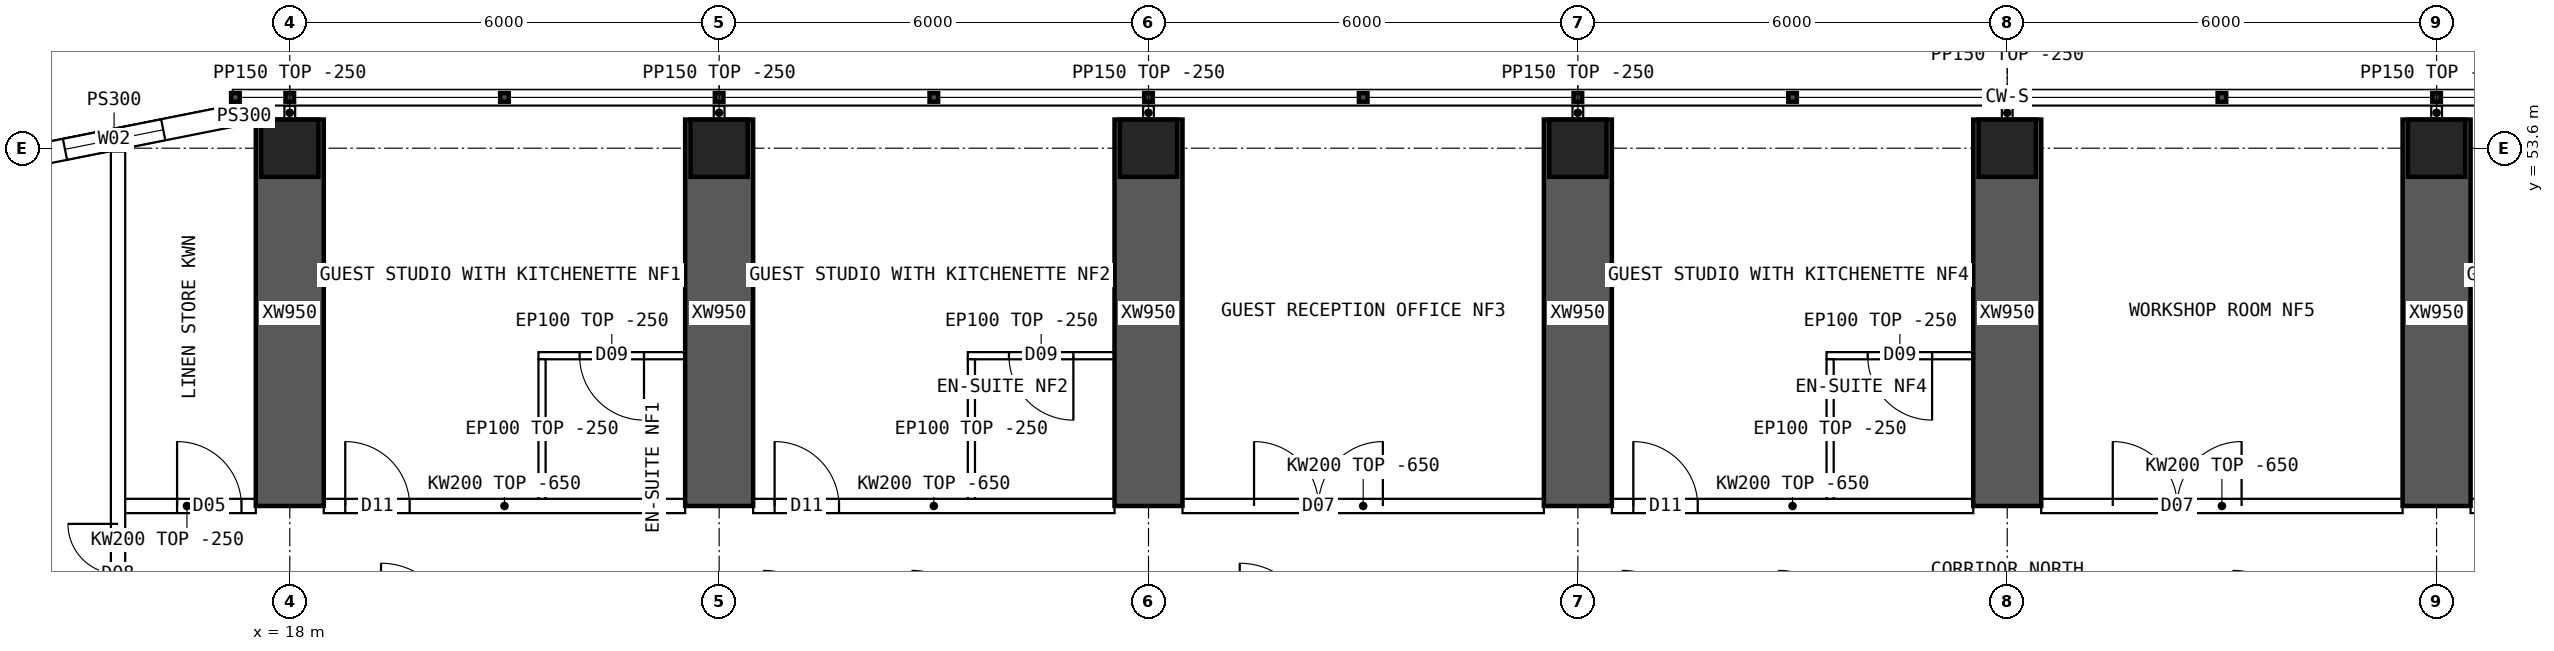
"""IFC4 building model, lengths in metres.
Left out: names, types, materials, properties, quantities, classifications, styles, units other than length and angle.
Written with IfcOpenShell. Run it as: python <this file> out.ifc"""

import sys

from ifc_helpers import new_model, si_unit, direction, frame, frame_2d, origin, origin_2d, place, context, subcontext, project, spatial, polyline, rectangle, hollow_rectangle, outline, extrude, element, fill, save


model = new_model("IFC4")
c1 = context("Model", 3, precision=1e-05, world=origin(), true_north=direction((0.0, 1.0)))
c2 = subcontext(c1, "Body", "Model", "MODEL_VIEW")
j1 = project(units=[si_unit("LENGTHUNIT", "METRE"), si_unit("PLANEANGLEUNIT", "RADIAN")], contexts=[c1])
p1 = place(None, origin())
s1 = spatial("IfcSite", under=j1, at=p1, CompositionType="ELEMENT")
p2 = place(p1, origin())
s2 = spatial("IfcBuilding", under=s1, at=p2, CompositionType="ELEMENT")
p3 = place(p2, frame((0.0, 0.0, 140.35)))
s3 = spatial("IfcBuildingStorey", under=s2, at=p3, CompositionType="ELEMENT", Elevation=140.35)
for number, where, z_axis, x_axis in (
    (1, (18.0, 53.6, 0.0), (0.0, 0.0, 1.0), (1.0, 0.0, 0.0)),
    (2, (24.0, 53.6, 0.0), (0.0, 0.0, 1.0), (1.0, 0.0, 0.0)),
    (3, (30.0, 53.6, 0.0), (0.0, 0.0, 1.0), (1.0, 0.0, 0.0)),
    (4, (36.0, 53.6, 0.0), (0.0, 0.0, 1.0), (1.0, 0.0, 0.0)),
    (5, (42.0, 53.6, 0.0), (0.0, 0.0, 1.0), (1.0, 0.0, 0.0)),
    (6, (48.0, 53.6, 0.0), (0.0, 0.0, 1.0), (1.0, 0.0, 0.0)),
):
    element("IfcColumn", number, at=place(p3, frame(where, z_axis=z_axis, x_axis=x_axis)), inside=s3, PredefinedType="COLUMN", context=c2, shape_type="SweptSolid", body=[
        extrude(hollow_rectangle(XDim=0.8, YDim=0.8, WallThickness=0.08, at=origin_2d()), origin(), (0.0, 0.0, 1.0), 4.5),
    ])
for number, where, z_axis, x_axis in (
    (7, (18.0, 48.6, 0.0), (0.0, 0.0, 1.0), (0.0, 1.0, 0.0)),
    (8, (24.0, 48.6, 0.0), (0.0, 0.0, 1.0), (0.0, 1.0, 0.0)),
    (9, (30.0, 48.6, 0.0), (0.0, 0.0, 1.0), (0.0, 1.0, 0.0)),
    (10, (36.0, 48.6, 0.0), (0.0, 0.0, 1.0), (0.0, 1.0, 0.0)),
    (11, (42.0, 48.6, 0.0), (0.0, 0.0, 1.0), (0.0, 1.0, 0.0)),
    (12, (48.0, 48.6, 0.0), (0.0, 0.0, 1.0), (0.0, 1.0, 0.0)),
):
    element("IfcWall", number, at=place(p3, frame(where, z_axis=z_axis, x_axis=x_axis)), inside=s3, PredefinedType="SHEAR", context=c2, shape_type="SweptSolid", body=[
        extrude(rectangle(XDim=5.4, YDim=0.95, at=frame_2d((2.7, 0.0))), origin(), (0.0, 0.0, 1.0), 4.5),
    ])
p4 = place(p3, frame((17.2, 54.05, 0.0), z_axis=(0.0, 0.0, 1.0), x_axis=(-0.98078325777, -0.195100490205, 0.0)))
e13 = element("IfcWall", 13, at=p4, inside=s3, PredefinedType="SOLIDWALL", context=c2, shape_type="SweptSolid", body=[
    extrude(outline(polyline([(-0.03, -0.15), (3.405, -0.15), (3.345, 0.15), (0.03, 0.15), (-0.03, -0.15)])), origin(), (0.0, 0.0, 1.0), 4.25),
])
p5 = place(p4, frame((0.988, 0.0, 0.9)))
e14 = element("IfcOpeningElement", 14, at=p5, cuts=e13, PredefinedType="OPENING", context=c2, shape_type="SweptSolid", body=[
    extrude(rectangle(XDim=1.4, YDim=1.8, at=frame_2d((0.7, 0.9))), frame((0.0, 0.16, 0.0), z_axis=(0.0, -1.0, 0.0), x_axis=(1.0, 0.0, 0.0)), (0.0, 0.0, 1.0), 0.32),
])
p6 = place(p3, frame((17.2, 54.05, 0.0), z_axis=(0.0, 0.0, 1.0), x_axis=(1.0, 0.0, 0.0)))
e15 = element("IfcWall", 15, at=p6, inside=s3, PredefinedType="SOLIDWALL", context=c2, shape_type="SweptSolid", body=[
    extrude(rectangle(XDim=0.325, YDim=0.3, at=frame_2d((0.163, 0.0))), origin(), (0.0, 0.0, 1.0), 4.25),
])
p7 = place(p3, frame((15.6, 48.6, 0.0), z_axis=(0.0, 0.0, 1.0), x_axis=(1.0, 0.0, 0.0)))
e16 = element("IfcWall", 16, at=p7, inside=s3, PredefinedType="SOLIDWALL", context=c2, shape_type="SweptSolid", body=[
    extrude(rectangle(XDim=1.925, YDim=0.2, at=frame_2d((0.962, 0.0))), origin(), (0.0, 0.0, 1.0), 4.25),
])
p8 = place(p7, frame((0.825, 0.0, 0.0)))
e17 = element("IfcOpeningElement", 17, at=p8, cuts=e16, PredefinedType="OPENING", context=c2, shape_type="SweptSolid", body=[
    extrude(rectangle(XDim=0.9, YDim=2.1, at=frame_2d((0.45, 1.05))), frame((0.0, 0.11, 0.0), z_axis=(0.0, -1.0, 0.0), x_axis=(1.0, 0.0, 0.0)), (0.0, 0.0, 1.0), 0.22),
])
p9 = place(p3, frame((18.475, 48.6, 0.0), z_axis=(0.0, 0.0, 1.0), x_axis=(1.0, 0.0, 0.0)))
e18 = element("IfcWall", 18, at=p9, inside=s3, PredefinedType="SOLIDWALL", context=c2, shape_type="SweptSolid", body=[
    extrude(outline(polyline([(0.0, 0.0), (5.05, 0.0), (5.05, 3.85), (0.0, 3.85), (0.0, 0.0)])), frame((0.0, 0.1, 0.0), z_axis=(0.0, -1.0, 0.0), x_axis=(1.0, 0.0, 0.0)), (0.0, 0.0, 1.0), 0.2),
])
p10 = place(p9, frame((0.3, 0.0, 0.0)))
e19 = element("IfcOpeningElement", 19, at=p10, cuts=e18, PredefinedType="OPENING", context=c2, shape_type="SweptSolid", body=[
    extrude(rectangle(XDim=0.9, YDim=2.1, at=frame_2d((0.45, 1.05))), frame((0.0, 0.11, 0.0), z_axis=(0.0, -1.0, 0.0), x_axis=(1.0, 0.0, 0.0)), (0.0, 0.0, 1.0), 0.22),
])
p11 = place(p3, frame((24.475, 48.6, 0.0), z_axis=(0.0, 0.0, 1.0), x_axis=(1.0, 0.0, 0.0)))
e20 = element("IfcWall", 20, at=p11, inside=s3, PredefinedType="SOLIDWALL", context=c2, shape_type="SweptSolid", body=[
    extrude(outline(polyline([(0.0, 0.0), (5.05, 0.0), (5.05, 3.85), (0.0, 3.85), (0.0, 0.0)])), frame((0.0, 0.1, 0.0), z_axis=(0.0, -1.0, 0.0), x_axis=(1.0, 0.0, 0.0)), (0.0, 0.0, 1.0), 0.2),
])
p12 = place(p11, frame((0.3, 0.0, 0.0)))
e21 = element("IfcOpeningElement", 21, at=p12, cuts=e20, PredefinedType="OPENING", context=c2, shape_type="SweptSolid", body=[
    extrude(rectangle(XDim=0.9, YDim=2.1, at=frame_2d((0.45, 1.05))), frame((0.0, 0.11, 0.0), z_axis=(0.0, -1.0, 0.0), x_axis=(1.0, 0.0, 0.0)), (0.0, 0.0, 1.0), 0.22),
])
p13 = place(p3, frame((30.475, 48.6, 0.0), z_axis=(0.0, 0.0, 1.0), x_axis=(1.0, 0.0, 0.0)))
e22 = element("IfcWall", 22, at=p13, inside=s3, PredefinedType="SOLIDWALL", context=c2, shape_type="SweptSolid", body=[
    extrude(outline(polyline([(0.0, 0.0), (5.05, 0.0), (5.05, 3.85), (0.0, 3.85), (0.0, 0.0)])), frame((0.0, 0.1, 0.0), z_axis=(0.0, -1.0, 0.0), x_axis=(1.0, 0.0, 0.0)), (0.0, 0.0, 1.0), 0.2),
])
p14 = place(p13, frame((1.0, 0.0, 0.0)))
e23 = element("IfcOpeningElement", 23, at=p14, cuts=e22, PredefinedType="OPENING", context=c2, shape_type="SweptSolid", body=[
    extrude(rectangle(XDim=1.8, YDim=2.1, at=frame_2d((0.9, 1.05))), frame((0.0, 0.11, 0.0), z_axis=(0.0, -1.0, 0.0), x_axis=(1.0, 0.0, 0.0)), (0.0, 0.0, 1.0), 0.22),
])
p15 = place(p3, frame((36.475, 48.6, 0.0), z_axis=(0.0, 0.0, 1.0), x_axis=(1.0, 0.0, 0.0)))
e24 = element("IfcWall", 24, at=p15, inside=s3, PredefinedType="SOLIDWALL", context=c2, shape_type="SweptSolid", body=[
    extrude(outline(polyline([(0.0, 0.0), (5.05, 0.0), (5.05, 3.85), (0.0, 3.85), (0.0, 0.0)])), frame((0.0, 0.1, 0.0), z_axis=(0.0, -1.0, 0.0), x_axis=(1.0, 0.0, 0.0)), (0.0, 0.0, 1.0), 0.2),
])
p16 = place(p15, frame((0.3, 0.0, 0.0)))
e25 = element("IfcOpeningElement", 25, at=p16, cuts=e24, PredefinedType="OPENING", context=c2, shape_type="SweptSolid", body=[
    extrude(rectangle(XDim=0.9, YDim=2.1, at=frame_2d((0.45, 1.05))), frame((0.0, 0.11, 0.0), z_axis=(0.0, -1.0, 0.0), x_axis=(1.0, 0.0, 0.0)), (0.0, 0.0, 1.0), 0.22),
])
p17 = place(p3, frame((42.475, 48.6, 0.0), z_axis=(0.0, 0.0, 1.0), x_axis=(1.0, 0.0, 0.0)))
e26 = element("IfcWall", 26, at=p17, inside=s3, PredefinedType="SOLIDWALL", context=c2, shape_type="SweptSolid", body=[
    extrude(outline(polyline([(0.0, 0.0), (5.05, 0.0), (5.05, 3.85), (0.0, 3.85), (0.0, 0.0)])), frame((0.0, 0.1, 0.0), z_axis=(0.0, -1.0, 0.0), x_axis=(1.0, 0.0, 0.0)), (0.0, 0.0, 1.0), 0.2),
])
p18 = place(p17, frame((1.0, 0.0, 0.0)))
e27 = element("IfcOpeningElement", 27, at=p18, cuts=e26, PredefinedType="OPENING", context=c2, shape_type="SweptSolid", body=[
    extrude(rectangle(XDim=1.8, YDim=2.1, at=frame_2d((0.9, 1.05))), frame((0.0, 0.11, 0.0), z_axis=(0.0, -1.0, 0.0), x_axis=(1.0, 0.0, 0.0)), (0.0, 0.0, 1.0), 0.22),
])
p19 = place(p3, frame((48.475, 48.6, 0.0), z_axis=(0.0, 0.0, 1.0), x_axis=(1.0, 0.0, 0.0)))
e28 = element("IfcWall", 28, at=p19, inside=s3, PredefinedType="SOLIDWALL", context=c2, shape_type="SweptSolid", body=[
    extrude(outline(polyline([(0.0, 0.0), (5.05, 0.0), (5.05, 3.85), (0.0, 3.85), (0.0, 0.0)])), frame((0.0, 0.1, 0.0), z_axis=(0.0, -1.0, 0.0), x_axis=(1.0, 0.0, 0.0)), (0.0, 0.0, 1.0), 0.2),
])
p20 = place(p19, frame((0.3, 0.0, 0.0)))
e29 = element("IfcOpeningElement", 29, at=p20, cuts=e28, PredefinedType="OPENING", context=c2, shape_type="SweptSolid", body=[
    extrude(rectangle(XDim=0.9, YDim=2.1, at=frame_2d((0.45, 1.05))), frame((0.0, 0.11, 0.0), z_axis=(0.0, -1.0, 0.0), x_axis=(1.0, 0.0, 0.0)), (0.0, 0.0, 1.0), 0.22),
])
p21 = place(p3, frame((21.475, 50.7, 0.0), z_axis=(0.0, 0.0, 1.0), x_axis=(1.0, 0.0, 0.0)))
e30 = element("IfcWall", 30, at=p21, inside=s3, PredefinedType="PARTITIONING", context=c2, shape_type="SweptSolid", body=[
    extrude(rectangle(XDim=2.05, YDim=0.1, at=frame_2d((1.025, 0.0))), origin(), (0.0, 0.0, 1.0), 4.25),
])
p22 = place(p21, frame((0.575, 0.0, 0.0)))
e31 = element("IfcOpeningElement", 31, at=p22, cuts=e30, PredefinedType="OPENING", context=c2, shape_type="SweptSolid", body=[
    extrude(rectangle(XDim=0.9, YDim=2.1, at=frame_2d((0.45, 1.05))), frame((0.0, 0.06, 0.0), z_axis=(0.0, -1.0, 0.0), x_axis=(1.0, 0.0, 0.0)), (0.0, 0.0, 1.0), 0.12),
])
p23 = place(p3, frame((21.525, 50.65, 0.0), z_axis=(0.0, 0.0, 1.0), x_axis=(0.0, -1.0, 0.0)))
e32 = element("IfcWall", 32, at=p23, inside=s3, PredefinedType="PARTITIONING", context=c2, shape_type="SweptSolid", body=[
    extrude(outline(polyline([(0.0, 0.0), (1.95, 0.0), (1.95, 3.85), (1.902, 3.85), (1.9, 4.25), (0.0, 4.25), (0.0, 0.0)])), frame((0.0, 0.05, 0.0), z_axis=(0.0, -1.0, 0.0), x_axis=(1.0, 0.0, 0.0)), (0.0, 0.0, 1.0), 0.1),
])
p24 = place(p3, frame((27.475, 50.7, 0.0), z_axis=(0.0, 0.0, 1.0), x_axis=(1.0, 0.0, 0.0)))
e33 = element("IfcWall", 33, at=p24, inside=s3, PredefinedType="PARTITIONING", context=c2, shape_type="SweptSolid", body=[
    extrude(rectangle(XDim=2.05, YDim=0.1, at=frame_2d((1.025, 0.0))), origin(), (0.0, 0.0, 1.0), 4.25),
])
p25 = place(p24, frame((0.575, 0.0, 0.0)))
e34 = element("IfcOpeningElement", 34, at=p25, cuts=e33, PredefinedType="OPENING", context=c2, shape_type="SweptSolid", body=[
    extrude(rectangle(XDim=0.9, YDim=2.1, at=frame_2d((0.45, 1.05))), frame((0.0, 0.06, 0.0), z_axis=(0.0, -1.0, 0.0), x_axis=(1.0, 0.0, 0.0)), (0.0, 0.0, 1.0), 0.12),
])
p26 = place(p3, frame((27.525, 50.65, 0.0), z_axis=(0.0, 0.0, 1.0), x_axis=(0.0, -1.0, 0.0)))
e35 = element("IfcWall", 35, at=p26, inside=s3, PredefinedType="PARTITIONING", context=c2, shape_type="SweptSolid", body=[
    extrude(outline(polyline([(0.0, 0.0), (1.95, 0.0), (1.95, 3.85), (1.902, 3.85), (1.9, 4.25), (0.0, 4.25), (0.0, 0.0)])), frame((0.0, 0.05, 0.0), z_axis=(0.0, -1.0, 0.0), x_axis=(1.0, 0.0, 0.0)), (0.0, 0.0, 1.0), 0.1),
])
p27 = place(p3, frame((39.475, 50.7, 0.0), z_axis=(0.0, 0.0, 1.0), x_axis=(1.0, 0.0, 0.0)))
e36 = element("IfcWall", 36, at=p27, inside=s3, PredefinedType="PARTITIONING", context=c2, shape_type="SweptSolid", body=[
    extrude(rectangle(XDim=2.05, YDim=0.1, at=frame_2d((1.025, 0.0))), origin(), (0.0, 0.0, 1.0), 4.25),
])
p28 = place(p27, frame((0.575, 0.0, 0.0)))
e37 = element("IfcOpeningElement", 37, at=p28, cuts=e36, PredefinedType="OPENING", context=c2, shape_type="SweptSolid", body=[
    extrude(rectangle(XDim=0.9, YDim=2.1, at=frame_2d((0.45, 1.05))), frame((0.0, 0.06, 0.0), z_axis=(0.0, -1.0, 0.0), x_axis=(1.0, 0.0, 0.0)), (0.0, 0.0, 1.0), 0.12),
])
p29 = place(p3, frame((39.525, 50.65, 0.0), z_axis=(0.0, 0.0, 1.0), x_axis=(0.0, -1.0, 0.0)))
e38 = element("IfcWall", 38, at=p29, inside=s3, PredefinedType="PARTITIONING", context=c2, shape_type="SweptSolid", body=[
    extrude(outline(polyline([(0.0, 0.0), (1.95, 0.0), (1.95, 3.85), (1.902, 3.85), (1.9, 4.25), (0.0, 4.25), (0.0, 0.0)])), frame((0.0, 0.05, 0.0), z_axis=(0.0, -1.0, 0.0), x_axis=(1.0, 0.0, 0.0)), (0.0, 0.0, 1.0), 0.1),
])
p30 = place(p3, frame((15.6, 10.446, 0.0), z_axis=(0.0, 0.0, 1.0), x_axis=(0.0, 1.0, 0.0)))
e39 = element("IfcWall", 39, at=p30, inside=s3, PredefinedType="SOLIDWALL", context=c2, shape_type="SweptSolid", body=[
    extrude(rectangle(XDim=43.107, YDim=0.2, at=frame_2d((21.554, 0.0))), origin(), (0.0, 0.0, 1.0), 4.25),
])
p31 = place(p30, frame((13.914, 0.0, 0.0)))
e40 = element("IfcOpeningElement", 40, at=p31, cuts=e39, PredefinedType="OPENING", context=c2, shape_type="SweptSolid", body=[
    extrude(rectangle(XDim=1.2, YDim=2.1, at=frame_2d((0.6, 1.05))), frame((0.0, 0.11, 0.0), z_axis=(0.0, -1.0, 0.0), x_axis=(1.0, 0.0, 0.0)), (0.0, 0.0, 1.0), 0.22),
])
p32 = place(p30, frame((22.634, 0.0, 0.0)))
e41 = element("IfcOpeningElement", 41, at=p32, cuts=e39, PredefinedType="OPENING", context=c2, shape_type="SweptSolid", body=[
    extrude(rectangle(XDim=1.2, YDim=2.1, at=frame_2d((0.6, 1.05))), frame((0.0, 0.11, 0.0), z_axis=(0.0, -1.0, 0.0), x_axis=(1.0, 0.0, 0.0)), (0.0, 0.0, 1.0), 0.22),
])
p33 = place(p30, frame((5.104, 0.0, 0.0)))
e42 = element("IfcOpeningElement", 42, at=p33, cuts=e39, PredefinedType="OPENING", context=c2, shape_type="SweptSolid", body=[
    extrude(rectangle(XDim=1.4, YDim=2.1, at=frame_2d((0.7, 1.05))), frame((0.0, 0.11, 0.0), z_axis=(0.0, -1.0, 0.0), x_axis=(1.0, 0.0, 0.0)), (0.0, 0.0, 1.0), 0.22),
])
p34 = place(p30, frame((36.504, 0.0, 0.0)))
e43 = element("IfcOpeningElement", 43, at=p34, cuts=e39, PredefinedType="OPENING", context=c2, shape_type="SweptSolid", body=[
    extrude(rectangle(XDim=1.4, YDim=2.1, at=frame_2d((0.7, 1.05))), frame((0.0, 0.11, 0.0), z_axis=(0.0, -1.0, 0.0), x_axis=(1.0, 0.0, 0.0)), (0.0, 0.0, 1.0), 0.22),
])
for number, where, z_axis, x_axis in (
    (44, (18.0, 54.0, 0.0), (0.0, 0.0, 1.0), (0.0, 1.0, 0.0)),
    (45, (24.0, 54.0, 0.0), (0.0, 0.0, 1.0), (0.0, 1.0, 0.0)),
    (46, (30.0, 54.0, 0.0), (0.0, 0.0, 1.0), (0.0, 1.0, 0.0)),
    (47, (36.0, 54.0, 0.0), (0.0, 0.0, 1.0), (0.0, 1.0, 0.0)),
    (48, (42.0, 54.0, 0.0), (0.0, 0.0, 1.0), (0.0, 1.0, 0.0)),
    (49, (48.0, 54.0, 0.0), (0.0, 0.0, 1.0), (0.0, 1.0, 0.0)),
):
    element("IfcWall", number, at=place(p3, frame(where, z_axis=z_axis, x_axis=x_axis)), inside=s3, PredefinedType="PARTITIONING", context=c2, shape_type="SweptSolid", body=[
        extrude(rectangle(XDim=0.19, YDim=0.15, at=frame_2d((0.095, 0.0))), origin(), (0.0, 0.0, 1.0), 4.25),
    ])
p35 = place(p5, origin())
e50 = element("IfcWindow", 50, at=p35, inside=s3, PartitioningType="SINGLE_PANEL", PredefinedType="WINDOW", context=c2, shape_type="SweptSolid", body=[
    extrude(rectangle(XDim=1.4, YDim=1.8, at=frame_2d((0.7, 0.9))), frame((0.0, 0.03, 0.0), z_axis=(0.0, -1.0, 0.0), x_axis=(1.0, 0.0, 0.0)), (0.0, 0.0, 1.0), 0.06),
])
fill(e14, e50)
p36 = place(p22, origin())
e51 = element("IfcDoor", 51, at=p36, inside=s3, OperationType="SINGLE_SWING_RIGHT", PredefinedType="DOOR", context=c2, shape_type="SweptSolid", body=[
    extrude(rectangle(XDim=0.9, YDim=2.1, at=frame_2d((0.45, 1.05))), frame((0.0, 0.025, 0.0), z_axis=(0.0, -1.0, 0.0), x_axis=(1.0, 0.0, 0.0)), (0.0, 0.0, 1.0), 0.05),
])
fill(e31, e51)
p37 = place(p10, origin())
e52 = element("IfcDoor", 52, at=p37, inside=s3, OperationType="SINGLE_SWING_LEFT", PredefinedType="DOOR", context=c2, shape_type="SweptSolid", body=[
    extrude(rectangle(XDim=0.9, YDim=2.1, at=frame_2d((0.45, 1.05))), frame((0.0, 0.025, 0.0), z_axis=(0.0, -1.0, 0.0), x_axis=(1.0, 0.0, 0.0)), (0.0, 0.0, 1.0), 0.05),
])
fill(e19, e52)
p38 = place(p25, origin())
e53 = element("IfcDoor", 53, at=p38, inside=s3, OperationType="SINGLE_SWING_RIGHT", PredefinedType="DOOR", context=c2, shape_type="SweptSolid", body=[
    extrude(rectangle(XDim=0.9, YDim=2.1, at=frame_2d((0.45, 1.05))), frame((0.0, 0.025, 0.0), z_axis=(0.0, -1.0, 0.0), x_axis=(1.0, 0.0, 0.0)), (0.0, 0.0, 1.0), 0.05),
])
fill(e34, e53)
p39 = place(p12, origin())
e54 = element("IfcDoor", 54, at=p39, inside=s3, OperationType="SINGLE_SWING_LEFT", PredefinedType="DOOR", context=c2, shape_type="SweptSolid", body=[
    extrude(rectangle(XDim=0.9, YDim=2.1, at=frame_2d((0.45, 1.05))), frame((0.0, 0.025, 0.0), z_axis=(0.0, -1.0, 0.0), x_axis=(1.0, 0.0, 0.0)), (0.0, 0.0, 1.0), 0.05),
])
fill(e21, e54)
p40 = place(p14, origin())
e55 = element("IfcDoor", 55, at=p40, inside=s3, OperationType="DOUBLE_DOOR_SINGLE_SWING", PredefinedType="DOOR", context=c2, shape_type="SweptSolid", body=[
    extrude(rectangle(XDim=1.8, YDim=2.1, at=frame_2d((0.9, 1.05))), frame((0.0, 0.025, 0.0), z_axis=(0.0, -1.0, 0.0), x_axis=(1.0, 0.0, 0.0)), (0.0, 0.0, 1.0), 0.05),
])
fill(e23, e55)
p41 = place(p28, origin())
e56 = element("IfcDoor", 56, at=p41, inside=s3, OperationType="SINGLE_SWING_RIGHT", PredefinedType="DOOR", context=c2, shape_type="SweptSolid", body=[
    extrude(rectangle(XDim=0.9, YDim=2.1, at=frame_2d((0.45, 1.05))), frame((0.0, 0.025, 0.0), z_axis=(0.0, -1.0, 0.0), x_axis=(1.0, 0.0, 0.0)), (0.0, 0.0, 1.0), 0.05),
])
fill(e37, e56)
p42 = place(p16, origin())
e57 = element("IfcDoor", 57, at=p42, inside=s3, OperationType="SINGLE_SWING_LEFT", PredefinedType="DOOR", context=c2, shape_type="SweptSolid", body=[
    extrude(rectangle(XDim=0.9, YDim=2.1, at=frame_2d((0.45, 1.05))), frame((0.0, 0.025, 0.0), z_axis=(0.0, -1.0, 0.0), x_axis=(1.0, 0.0, 0.0)), (0.0, 0.0, 1.0), 0.05),
])
fill(e25, e57)
p43 = place(p18, origin())
e58 = element("IfcDoor", 58, at=p43, inside=s3, OperationType="DOUBLE_DOOR_SINGLE_SWING", PredefinedType="DOOR", context=c2, shape_type="SweptSolid", body=[
    extrude(rectangle(XDim=1.8, YDim=2.1, at=frame_2d((0.9, 1.05))), frame((0.0, 0.025, 0.0), z_axis=(0.0, -1.0, 0.0), x_axis=(1.0, 0.0, 0.0)), (0.0, 0.0, 1.0), 0.05),
])
fill(e27, e58)
p44 = place(p34, origin())
e59 = element("IfcDoor", 59, at=p44, inside=s3, OperationType="DOUBLE_DOOR_SINGLE_SWING", PredefinedType="DOOR", context=c2, shape_type="SweptSolid", body=[
    extrude(rectangle(XDim=1.4, YDim=2.1, at=frame_2d((0.7, 1.05))), frame((0.0, 0.025, 0.0), z_axis=(0.0, -1.0, 0.0), x_axis=(1.0, 0.0, 0.0)), (0.0, 0.0, 1.0), 0.05),
])
fill(e43, e59)
p45 = place(p8, origin())
e60 = element("IfcDoor", 60, at=p45, inside=s3, OperationType="SINGLE_SWING_LEFT", PredefinedType="DOOR", context=c2, shape_type="SweptSolid", body=[
    extrude(rectangle(XDim=0.9, YDim=2.1, at=frame_2d((0.45, 1.05))), frame((0.0, 0.025, 0.0), z_axis=(0.0, -1.0, 0.0), x_axis=(1.0, 0.0, 0.0)), (0.0, 0.0, 1.0), 0.05),
])
fill(e17, e60)
save(model, sys.argv[1])
